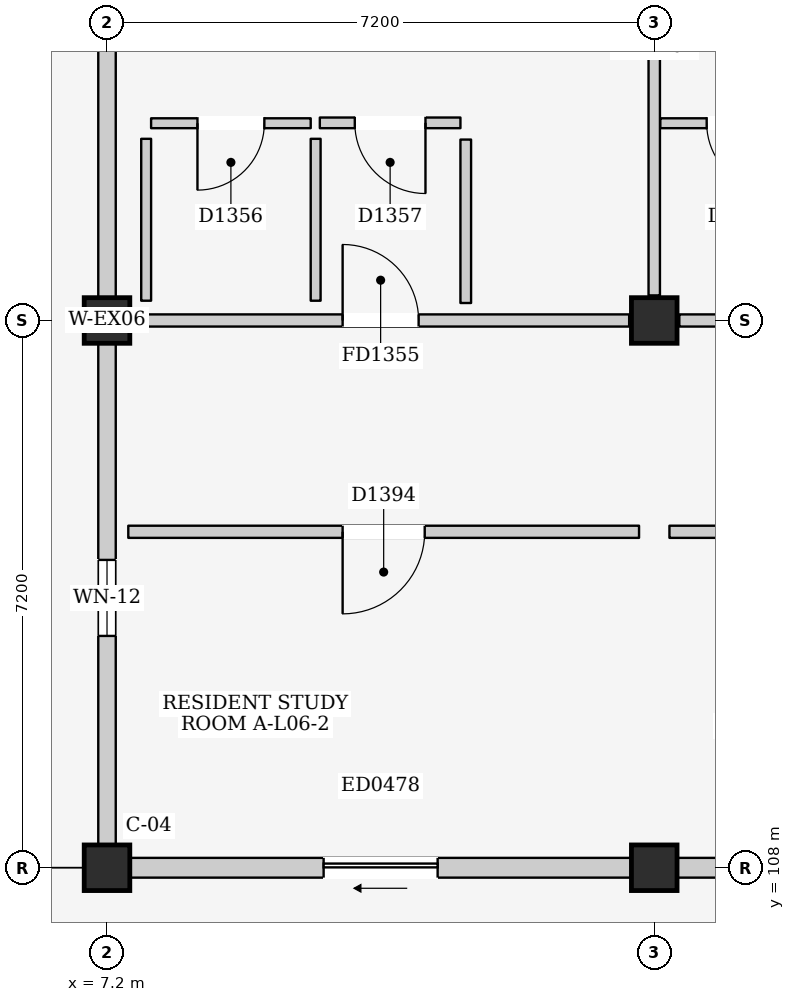
"""IFC4 building model, lengths in metres.
Left out: names, types, materials, properties, quantities, classifications, styles, units other than length and angle.
Written with IfcOpenShell. Run it as: python <this file> out.ifc"""

import sys

from ifc_helpers import new_model, si_unit, direction, frame, frame_2d, origin, origin_2d, place, context, subcontext, project, spatial, rectangle, extrude, element, fill, save


model = new_model("IFC4")
c1 = context("Model", 3, precision=1e-05, world=origin(), true_north=direction((0.0, 1.0)))
c2 = subcontext(c1, "Body", "Model", "MODEL_VIEW")
j1 = project(units=[si_unit("LENGTHUNIT", "METRE"), si_unit("PLANEANGLEUNIT", "RADIAN")], contexts=[c1])
p1 = place(None, origin())
s1 = spatial("IfcSite", under=j1, at=p1, CompositionType="ELEMENT")
p2 = place(p1, origin())
s2 = spatial("IfcBuilding", under=s1, at=p2, CompositionType="ELEMENT")
p3 = place(p2, frame((0.0, 0.0, 21.9)))
s3 = spatial("IfcBuildingStorey", under=s2, at=p3, CompositionType="ELEMENT", Elevation=21.9)
for number, where, z_axis, x_axis in (
    (1, (7.2, 108.0, 0.0), (0.0, 0.0, 1.0), (1.0, 0.0, 0.0)),
    (2, (7.2, 115.2, 0.0), (0.0, 0.0, 1.0), (1.0, 0.0, 0.0)),
    (3, (14.4, 108.0, 0.0), (0.0, 0.0, 1.0), (1.0, 0.0, 0.0)),
    (4, (14.4, 115.2, 0.0), (0.0, 0.0, 1.0), (1.0, 0.0, 0.0)),
):
    element("IfcColumn", number, at=place(p3, frame(where, z_axis=z_axis, x_axis=x_axis)), inside=s3, PredefinedType="COLUMN", context=c2, shape_type="SweptSolid", body=[
        extrude(rectangle(XDim=0.6, YDim=0.6, at=origin_2d()), origin(), (0.0, 0.0, 1.0), 3.2),
    ])
p4 = place(p3, frame((7.5, 108.0, 0.0), z_axis=(0.0, 0.0, 1.0), x_axis=(1.0, 0.0, 0.0)))
e5 = element("IfcWall", 5, at=p4, inside=s3, PredefinedType="ELEMENTEDWALL", context=c2, shape_type="SweptSolid", body=[
    extrude(rectangle(XDim=6.6, YDim=0.26, at=frame_2d((3.3, 0.0))), origin(), (0.0, 0.0, 1.0), 2.315),
])
p5 = place(p4, frame((2.55, 0.0, 0.0)))
e6 = element("IfcOpeningElement", 6, at=p5, cuts=e5, PredefinedType="OPENING", context=c2, shape_type="SweptSolid", body=[
    extrude(rectangle(XDim=1.5, YDim=2.12, at=frame_2d((0.75, 1.06))), frame((0.0, 0.145, 0.0), z_axis=(0.0, -1.0, 0.0), x_axis=(1.0, 0.0, 0.0)), (0.0, 0.0, 1.0), 0.29),
])
p6 = place(p3, frame((14.7, 108.0, 0.0), z_axis=(0.0, 0.0, 1.0), x_axis=(1.0, 0.0, 0.0)))
e7 = element("IfcWall", 7, at=p6, inside=s3, PredefinedType="ELEMENTEDWALL", context=c2, shape_type="SweptSolid", body=[
    extrude(rectangle(XDim=6.6, YDim=0.26, at=frame_2d((3.3, 0.0))), origin(), (0.0, 0.0, 1.0), 2.315),
])
p7 = place(p6, frame((2.55, 0.0, 0.0)))
e8 = element("IfcOpeningElement", 8, at=p7, cuts=e7, PredefinedType="OPENING", context=c2, shape_type="SweptSolid", body=[
    extrude(rectangle(XDim=1.5, YDim=2.12, at=frame_2d((0.75, 1.06))), frame((0.0, 0.145, 0.0), z_axis=(0.0, -1.0, 0.0), x_axis=(1.0, 0.0, 0.0)), (0.0, 0.0, 1.0), 0.29),
])
p8 = place(p3, frame((7.2, 108.3, 0.0), z_axis=(0.0, 0.0, 1.0), x_axis=(0.0, 1.0, 0.0)))
e9 = element("IfcWall", 9, at=p8, inside=s3, PredefinedType="ELEMENTEDWALL", context=c2, shape_type="SweptSolid", body=[
    extrude(rectangle(XDim=6.6, YDim=0.23, at=frame_2d((3.3, 0.0))), origin(), (0.0, 0.0, 1.0), 2.465),
])
p9 = place(p8, frame((2.75, 0.0, 1.1)))
e10 = element("IfcOpeningElement", 10, at=p9, cuts=e9, PredefinedType="OPENING", context=c2, shape_type="SweptSolid", body=[
    extrude(rectangle(XDim=1.0, YDim=0.9, at=frame_2d((0.5, 0.45))), frame((0.0, 0.13, 0.0), z_axis=(0.0, -1.0, 0.0), x_axis=(1.0, 0.0, 0.0)), (0.0, 0.0, 1.0), 0.26),
])
p10 = place(p3, frame((7.2, 115.5, 0.0), z_axis=(0.0, 0.0, 1.0), x_axis=(0.0, 1.0, 0.0)))
e11 = element("IfcWall", 11, at=p10, inside=s3, PredefinedType="ELEMENTEDWALL", context=c2, shape_type="SweptSolid", body=[
    extrude(rectangle(XDim=6.6, YDim=0.23, at=frame_2d((3.3, 0.0))), origin(), (0.0, 0.0, 1.0), 2.465),
])
p11 = place(p10, frame((3.6, 0.0, 0.0)))
e12 = element("IfcOpeningElement", 12, at=p11, cuts=e11, PredefinedType="OPENING", context=c2, shape_type="SweptSolid", body=[
    extrude(rectangle(XDim=1.08, YDim=2.12, at=frame_2d((0.54, 1.06))), frame((0.0, 0.13, 0.0), z_axis=(0.0, -1.0, 0.0), x_axis=(1.0, 0.0, 0.0)), (0.0, 0.0, 1.0), 0.26),
])
p12 = place(p3, frame((7.53, 115.2, 0.0), z_axis=(0.0, 0.0, 1.0), x_axis=(1.0, 0.0, 0.0)))
e13 = element("IfcWall", 13, at=p12, inside=s3, PredefinedType="PARTITIONING", context=c2, shape_type="SweptSolid", body=[
    extrude(rectangle(XDim=6.54, YDim=0.16, at=frame_2d((3.27, 0.0))), origin(), (0.0, 0.0, 1.0), 2.315),
])
p13 = place(p12, frame((2.77, 0.0, 0.0)))
e14 = element("IfcOpeningElement", 14, at=p13, cuts=e13, PredefinedType="OPENING", context=c2, shape_type="SweptSolid", body=[
    extrude(rectangle(XDim=1.0, YDim=2.15, at=frame_2d((0.5, 1.075))), frame((0.0, 0.095, 0.0), z_axis=(0.0, -1.0, 0.0), x_axis=(1.0, 0.0, 0.0)), (0.0, 0.0, 1.0), 0.19),
])
p14 = place(p3, frame((14.4, 115.53, 0.0), z_axis=(0.0, 0.0, 1.0), x_axis=(0.0, 1.0, 0.0)))
e15 = element("IfcWall", 15, at=p14, inside=s3, PredefinedType="PARTITIONING", context=c2, shape_type="SweptSolid", body=[
    extrude(rectangle(XDim=6.54, YDim=0.15, at=frame_2d((3.27, 0.0))), origin(), (0.0, 0.0, 1.0), 2.465),
])
p15 = place(p3, frame((7.78, 117.795, 0.0), z_axis=(0.0, 0.0, 1.0), x_axis=(1.0, 0.0, 0.0)))
e16 = element("IfcWall", 16, at=p15, inside=s3, PredefinedType="PARTITIONING", context=c2, shape_type="SweptSolid", body=[
    extrude(rectangle(XDim=2.1, YDim=0.13, at=frame_2d((1.05, 0.0))), origin(), (0.0, 0.0, 1.0), 2.98),
])
p16 = place(p15, frame((0.61, 0.0, 0.0)))
e17 = element("IfcOpeningElement", 17, at=p16, cuts=e16, PredefinedType="OPENING", context=c2, shape_type="SweptSolid", body=[
    extrude(rectangle(XDim=0.88, YDim=2.1, at=frame_2d((0.44, 1.05))), frame((0.0, 0.08, 0.0), z_axis=(0.0, -1.0, 0.0), x_axis=(1.0, 0.0, 0.0)), (0.0, 0.0, 1.0), 0.16),
])
for number, where, z_axis, x_axis in (
    (18, (9.945, 115.46, 0.0), (0.0, 0.0, 1.0), (0.0, 1.0, 0.0)),
    (19, (7.715, 115.46, 0.0), (0.0, 0.0, 1.0), (0.0, 1.0, 0.0)),
):
    element("IfcWall", number, at=place(p3, frame(where, z_axis=z_axis, x_axis=x_axis)), inside=s3, PredefinedType="PARTITIONING", context=c2, shape_type="SweptSolid", body=[
        extrude(rectangle(XDim=2.13, YDim=0.13, at=frame_2d((1.065, 0.0))), origin(), (0.0, 0.0, 1.0), 2.98),
    ])
p17 = place(p3, frame((10.0, 117.8, 0.0), z_axis=(0.0, 0.0, 1.0), x_axis=(1.0, 0.0, 0.0)))
e20 = element("IfcWall", 20, at=p17, inside=s3, PredefinedType="PARTITIONING", context=c2, shape_type="SweptSolid", body=[
    extrude(rectangle(XDim=1.85, YDim=0.14, at=frame_2d((0.925, 0.0))), origin(), (0.0, 0.0, 1.0), 2.98),
])
p18 = place(p17, frame((0.46, 0.0, 0.0)))
e21 = element("IfcOpeningElement", 21, at=p18, cuts=e20, PredefinedType="OPENING", context=c2, shape_type="SweptSolid", body=[
    extrude(rectangle(XDim=0.93, YDim=2.14, at=frame_2d((0.465, 1.07))), frame((0.0, 0.085, 0.0), z_axis=(0.0, -1.0, 0.0), x_axis=(1.0, 0.0, 0.0)), (0.0, 0.0, 1.0), 0.17),
])
p19 = place(p3, frame((11.92, 115.43, 0.0), z_axis=(0.0, 0.0, 1.0), x_axis=(0.0, 1.0, 0.0)))
e22 = element("IfcWall", 22, at=p19, inside=s3, PredefinedType="PARTITIONING", context=c2, shape_type="SweptSolid", body=[
    extrude(rectangle(XDim=2.15, YDim=0.14, at=frame_2d((1.075, 0.0))), origin(), (0.0, 0.0, 1.0), 2.98),
])
p20 = place(p3, frame((14.73, 115.2, 0.0), z_axis=(0.0, 0.0, 1.0), x_axis=(1.0, 0.0, 0.0)))
e23 = element("IfcWall", 23, at=p20, inside=s3, PredefinedType="PARTITIONING", context=c2, shape_type="SweptSolid", body=[
    extrude(rectangle(XDim=6.54, YDim=0.16, at=frame_2d((3.27, 0.0))), origin(), (0.0, 0.0, 1.0), 2.315),
])
p21 = place(p20, frame((2.77, 0.0, 0.0)))
e24 = element("IfcOpeningElement", 24, at=p21, cuts=e23, PredefinedType="OPENING", context=c2, shape_type="SweptSolid", body=[
    extrude(rectangle(XDim=1.0, YDim=2.15, at=frame_2d((0.5, 1.075))), frame((0.0, 0.095, 0.0), z_axis=(0.0, -1.0, 0.0), x_axis=(1.0, 0.0, 0.0)), (0.0, 0.0, 1.0), 0.19),
])
p22 = place(p3, frame((14.48, 117.795, 0.0), z_axis=(0.0, 0.0, 1.0), x_axis=(1.0, 0.0, 0.0)))
e25 = element("IfcWall", 25, at=p22, inside=s3, PredefinedType="PARTITIONING", context=c2, shape_type="SweptSolid", body=[
    extrude(rectangle(XDim=2.1, YDim=0.13, at=frame_2d((1.05, 0.0))), origin(), (0.0, 0.0, 1.0), 2.98),
])
p23 = place(p22, frame((0.61, 0.0, 0.0)))
e26 = element("IfcOpeningElement", 26, at=p23, cuts=e25, PredefinedType="OPENING", context=c2, shape_type="SweptSolid", body=[
    extrude(rectangle(XDim=0.88, YDim=2.1, at=frame_2d((0.44, 1.05))), frame((0.0, 0.08, 0.0), z_axis=(0.0, -1.0, 0.0), x_axis=(1.0, 0.0, 0.0)), (0.0, 0.0, 1.0), 0.16),
])
p24 = place(p3, frame((7.48, 112.42, 0.0), z_axis=(0.0, 0.0, 1.0), x_axis=(1.0, 0.0, 0.0)))
e27 = element("IfcWall", 27, at=p24, inside=s3, PredefinedType="PARTITIONING", context=c2, shape_type="SweptSolid", body=[
    extrude(rectangle(XDim=6.72, YDim=0.16, at=frame_2d((3.36, 0.0))), origin(), (0.0, 0.0, 1.0), 2.98),
])
p25 = place(p24, frame((2.82, 0.0, 0.0)))
e28 = element("IfcOpeningElement", 28, at=p25, cuts=e27, PredefinedType="OPENING", context=c2, shape_type="SweptSolid", body=[
    extrude(rectangle(XDim=1.08, YDim=2.22, at=frame_2d((0.54, 1.11))), frame((0.0, 0.095, 0.0), z_axis=(0.0, -1.0, 0.0), x_axis=(1.0, 0.0, 0.0)), (0.0, 0.0, 1.0), 0.19),
])
p26 = place(p3, frame((14.6, 112.42, 0.0), z_axis=(0.0, 0.0, 1.0), x_axis=(1.0, 0.0, 0.0)))
e29 = element("IfcWall", 29, at=p26, inside=s3, PredefinedType="PARTITIONING", context=c2, shape_type="SweptSolid", body=[
    extrude(rectangle(XDim=6.8, YDim=0.16, at=frame_2d((3.4, 0.0))), origin(), (0.0, 0.0, 1.0), 2.98),
])
p27 = place(p26, frame((2.86, 0.0, 0.0)))
e30 = element("IfcOpeningElement", 30, at=p27, cuts=e29, PredefinedType="OPENING", context=c2, shape_type="SweptSolid", body=[
    extrude(rectangle(XDim=1.08, YDim=2.22, at=frame_2d((0.54, 1.11))), frame((0.0, 0.095, 0.0), z_axis=(0.0, -1.0, 0.0), x_axis=(1.0, 0.0, 0.0)), (0.0, 0.0, 1.0), 0.19),
])
p28 = place(p5, frame((1.5, 0.0, 0.0), z_axis=(0.0, 0.0, 1.0), x_axis=(-1.0, 0.0, 0.0)))
e31 = element("IfcDoor", 31, at=p28, inside=s3, OperationType="SLIDING_TO_LEFT", PredefinedType="DOOR", context=c2, shape_type="SweptSolid", body=[
    extrude(rectangle(XDim=1.5, YDim=2.12, at=frame_2d((0.75, 1.06))), frame((0.0, 0.025, 0.0), z_axis=(0.0, -1.0, 0.0), x_axis=(1.0, 0.0, 0.0)), (0.0, 0.0, 1.0), 0.05),
])
fill(e6, e31)
p29 = place(p9, origin())
e32 = element("IfcWindow", 32, at=p29, inside=s3, PartitioningType="SINGLE_PANEL", PredefinedType="WINDOW", context=c2, shape_type="SweptSolid", body=[
    extrude(rectangle(XDim=1.0, YDim=0.9, at=frame_2d((0.5, 0.45))), frame((0.0, 0.03, 0.0), z_axis=(0.0, -1.0, 0.0), x_axis=(1.0, 0.0, 0.0)), (0.0, 0.0, 1.0), 0.06),
])
fill(e10, e32)
p30 = place(p13, origin())
e33 = element("IfcDoor", 33, at=p30, inside=s3, OperationType="SINGLE_SWING_LEFT", PredefinedType="DOOR", context=c2, shape_type="SweptSolid", body=[
    extrude(rectangle(XDim=1.0, YDim=2.15, at=frame_2d((0.5, 1.075))), frame((0.0, 0.025, 0.0), z_axis=(0.0, -1.0, 0.0), x_axis=(1.0, 0.0, 0.0)), (0.0, 0.0, 1.0), 0.05),
])
fill(e14, e33)
p31 = place(p16, frame((0.88, 0.0, 0.0), z_axis=(0.0, 0.0, 1.0), x_axis=(-1.0, 0.0, 0.0)))
e34 = element("IfcDoor", 34, at=p31, inside=s3, OperationType="SINGLE_SWING_RIGHT", PredefinedType="DOOR", context=c2, shape_type="SweptSolid", body=[
    extrude(rectangle(XDim=0.88, YDim=2.1, at=frame_2d((0.44, 1.05))), frame((0.0, 0.025, 0.0), z_axis=(0.0, -1.0, 0.0), x_axis=(1.0, 0.0, 0.0)), (0.0, 0.0, 1.0), 0.05),
])
fill(e17, e34)
p32 = place(p18, frame((0.93, 0.0, 0.0), z_axis=(0.0, 0.0, 1.0), x_axis=(-1.0, 0.0, 0.0)))
e35 = element("IfcDoor", 35, at=p32, inside=s3, OperationType="SINGLE_SWING_LEFT", PredefinedType="DOOR", context=c2, shape_type="SweptSolid", body=[
    extrude(rectangle(XDim=0.93, YDim=2.14, at=frame_2d((0.465, 1.07))), frame((0.0, 0.025, 0.0), z_axis=(0.0, -1.0, 0.0), x_axis=(1.0, 0.0, 0.0)), (0.0, 0.0, 1.0), 0.05),
])
fill(e21, e35)
p33 = place(p23, frame((0.88, 0.0, 0.0), z_axis=(0.0, 0.0, 1.0), x_axis=(-1.0, 0.0, 0.0)))
e36 = element("IfcDoor", 36, at=p33, inside=s3, OperationType="SINGLE_SWING_LEFT", PredefinedType="DOOR", context=c2, shape_type="SweptSolid", body=[
    extrude(rectangle(XDim=0.88, YDim=2.1, at=frame_2d((0.44, 1.05))), frame((0.0, 0.025, 0.0), z_axis=(0.0, -1.0, 0.0), x_axis=(1.0, 0.0, 0.0)), (0.0, 0.0, 1.0), 0.05),
])
fill(e26, e36)
p34 = place(p25, frame((1.08, 0.0, 0.0), z_axis=(0.0, 0.0, 1.0), x_axis=(-1.0, 0.0, 0.0)))
e37 = element("IfcDoor", 37, at=p34, inside=s3, OperationType="SINGLE_SWING_RIGHT", PredefinedType="DOOR", context=c2, shape_type="SweptSolid", body=[
    extrude(rectangle(XDim=1.08, YDim=2.22, at=frame_2d((0.54, 1.11))), frame((0.0, 0.025, 0.0), z_axis=(0.0, -1.0, 0.0), x_axis=(1.0, 0.0, 0.0)), (0.0, 0.0, 1.0), 0.05),
])
fill(e28, e37)
save(model, sys.argv[1])
